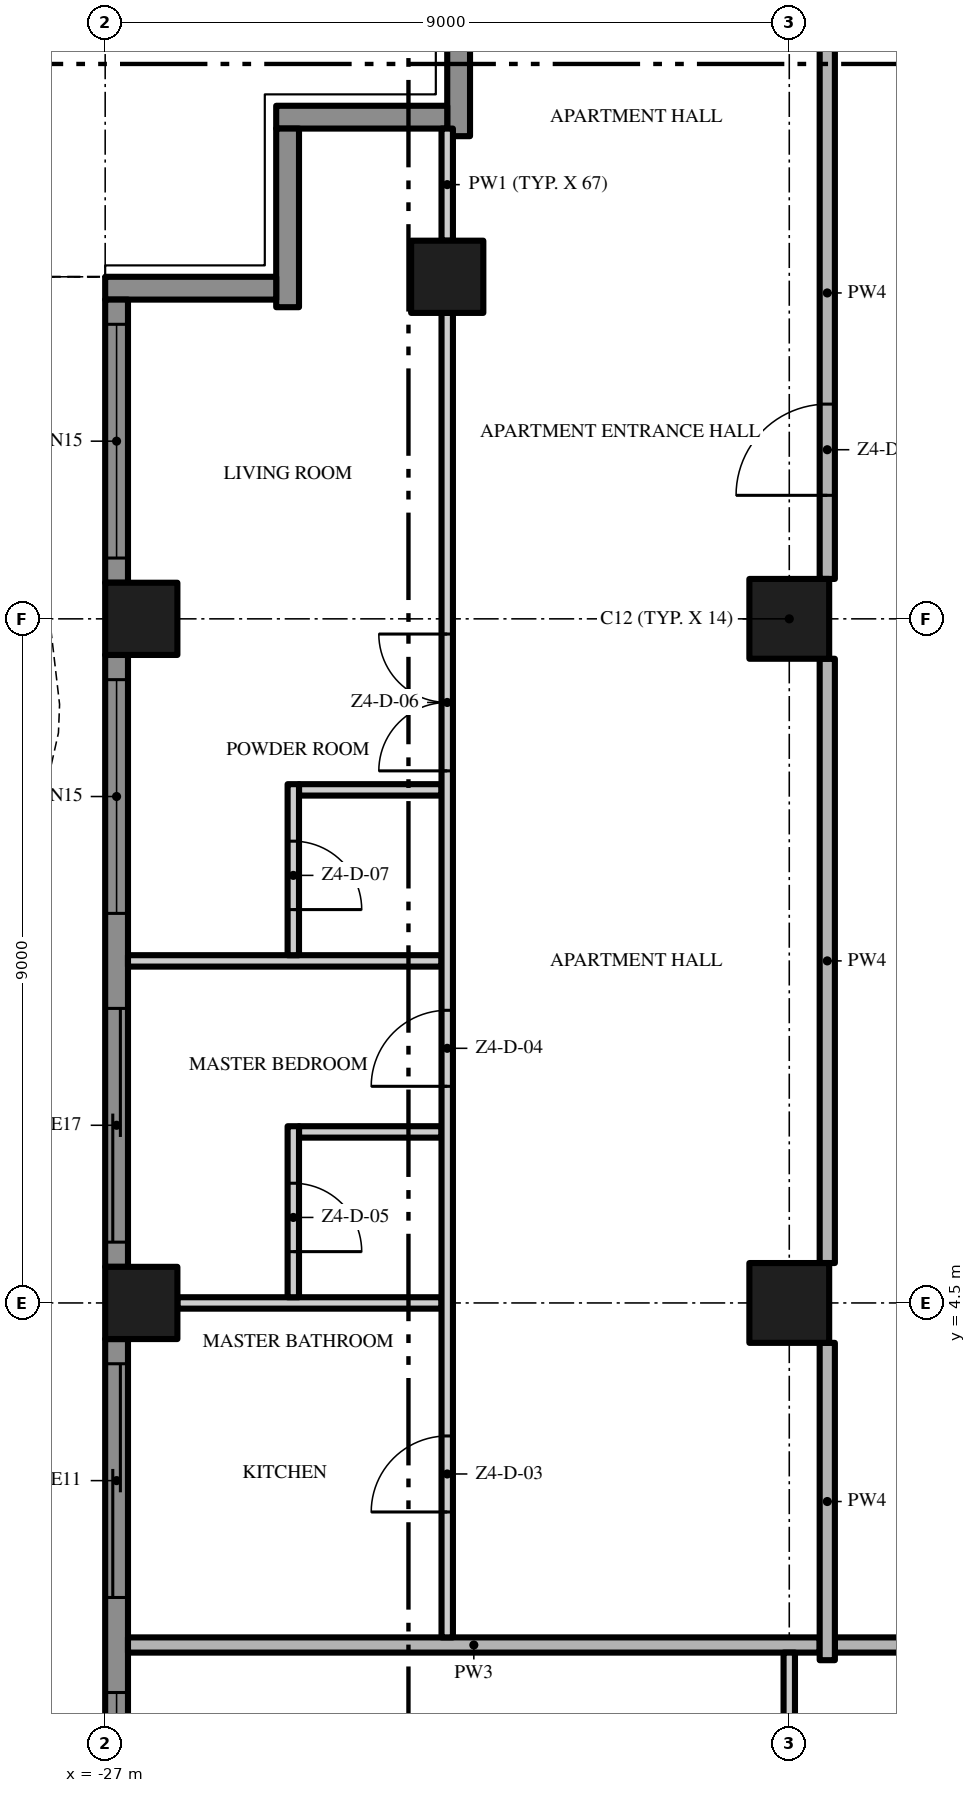
"""IFC4 building model, lengths in metres.
Left out: names, types, materials, properties, quantities, classifications, styles, units other than length and angle.
Written with IfcOpenShell. Run it as: python <this file> out.ifc"""

import sys

from ifc_helpers import new_model, si_unit, direction, frame, frame_2d, origin, origin_2d, place, context, subcontext, project, spatial, polyline, rectangle, outline, extrude, element, fill, save


model = new_model("IFC4")
c1 = context("Model", 3, precision=1e-05, world=origin(), true_north=direction((0.0, 1.0)))
c2 = subcontext(c1, "Body", "Model", "MODEL_VIEW")
j1 = project(units=[si_unit("LENGTHUNIT", "METRE"), si_unit("PLANEANGLEUNIT", "RADIAN")], contexts=[c1])
p1 = place(None, origin())
s1 = spatial("IfcSite", under=j1, at=p1, CompositionType="ELEMENT")
p2 = place(p1, origin())
s2 = spatial("IfcBuilding", under=s1, at=p2, CompositionType="ELEMENT")
p3 = place(p2, frame((0.0, 0.0, 222.4)))
s3 = spatial("IfcBuildingStorey", under=s2, at=p3, CompositionType="ELEMENT", Elevation=222.4)
for number, where, z_axis, x_axis in (
    (1, (-18.0, 13.5, 0.0), (0.0, 0.0, 1.0), (1.0, 0.0, 0.0)),
    (2, (-18.0, 4.5, 0.0), (0.0, 0.0, 1.0), (1.0, 0.0, 0.0)),
):
    element("IfcColumn", number, at=place(p3, frame(where, z_axis=z_axis, x_axis=x_axis)), inside=s3, PredefinedType="COLUMN", context=c2, shape_type="SweptSolid", body=[
        extrude(rectangle(XDim=1.05, YDim=1.05, at=origin_2d()), origin(), (0.0, 0.0, 1.0), 3.5),
    ])
for number, where, z_axis, x_axis in (
    (3, (-26.525, 13.5, 0.0), (0.0, 0.0, 1.0), (1.0, 0.0, 0.0)),
    (4, (-22.5, 18.0, 0.0), (0.0, 0.0, 1.0), (1.0, 0.0, 0.0)),
    (5, (-26.525, 4.5, 0.0), (0.0, 0.0, 1.0), (1.0, 0.0, 0.0)),
):
    element("IfcColumn", number, at=place(p3, frame(where, z_axis=z_axis, x_axis=x_axis)), inside=s3, PredefinedType="COLUMN", context=c2, shape_type="SweptSolid", body=[
        extrude(rectangle(XDim=0.95, YDim=0.95, at=origin_2d()), origin(), (0.0, 0.0, 1.0), 3.5),
    ])
p4 = place(p3, frame((-22.35, 19.85, 0.0), z_axis=(0.0, 0.0, 1.0), x_axis=(0.0, 1.0, 0.0)))
e6 = element("IfcWall", 6, at=p4, inside=s3, PredefinedType="SOLIDWALL", context=c2, shape_type="SweptSolid", body=[
    extrude(rectangle(XDim=2.35, YDim=0.3, at=frame_2d((1.175, 0.0))), origin(), (0.0, 0.0, 1.0), 3.5),
])
p5 = place(p3, frame((-24.75, 20.1, 0.0), z_axis=(0.0, 0.0, 1.0), x_axis=(1.0, 0.0, 0.0)))
e7 = element("IfcWall", 7, at=p5, inside=s3, PredefinedType="SOLIDWALL", context=c2, shape_type="SweptSolid", body=[
    extrude(rectangle(XDim=2.25, YDim=0.3, at=frame_2d((1.125, 0.0))), origin(), (0.0, 0.0, 1.0), 3.5),
])
p6 = place(p3, frame((-24.6, 17.6, 0.0), z_axis=(0.0, 0.0, 1.0), x_axis=(0.0, 1.0, 0.0)))
e8 = element("IfcWall", 8, at=p6, inside=s3, PredefinedType="SOLIDWALL", context=c2, shape_type="SweptSolid", body=[
    extrude(rectangle(XDim=2.35, YDim=0.3, at=frame_2d((1.175, 0.0))), origin(), (0.0, 0.0, 1.0), 3.5),
])
p7 = place(p3, frame((-27.0, 17.85, 0.0), z_axis=(0.0, 0.0, 1.0), x_axis=(1.0, 0.0, 0.0)))
e9 = element("IfcWall", 9, at=p7, inside=s3, PredefinedType="SOLIDWALL", context=c2, shape_type="SweptSolid", body=[
    extrude(rectangle(XDim=2.25, YDim=0.3, at=frame_2d((1.125, 0.0))), origin(), (0.0, 0.0, 1.0), 3.5),
])
p8 = place(p3, frame((-26.85, 13.975, 0.0), z_axis=(0.0, 0.0, 1.0), x_axis=(0.0, 1.0, 0.0)))
e10 = element("IfcWall", 10, at=p8, inside=s3, PredefinedType="SOLIDWALL", context=c2, shape_type="SweptSolid", body=[
    extrude(rectangle(XDim=3.725, YDim=0.3, at=frame_2d((1.863, 0.0))), origin(), (0.0, 0.0, 1.0), 3.5),
])
p9 = place(p8, frame((0.325, 0.0, 0.45)))
e11 = element("IfcOpeningElement", 11, at=p9, cuts=e10, PredefinedType="OPENING", context=c2, shape_type="SweptSolid", body=[
    extrude(rectangle(XDim=3.075, YDim=2.65, at=frame_2d((1.538, 1.325))), frame((0.0, 0.16, 0.0), z_axis=(0.0, -1.0, 0.0), x_axis=(1.0, 0.0, 0.0)), (0.0, 0.0, 1.0), 0.32),
])
p10 = place(p3, frame((-26.85, 4.975, 0.0), z_axis=(0.0, 0.0, 1.0), x_axis=(0.0, 1.0, 0.0)))
e12 = element("IfcWall", 12, at=p10, inside=s3, PredefinedType="SOLIDWALL", context=c2, shape_type="SweptSolid", body=[
    extrude(rectangle(XDim=8.05, YDim=0.3, at=frame_2d((4.025, 0.0))), origin(), (0.0, 0.0, 1.0), 3.5),
])
p11 = place(p10, frame((4.65, 0.0, 0.45)))
e13 = element("IfcOpeningElement", 13, at=p11, cuts=e12, PredefinedType="OPENING", context=c2, shape_type="SweptSolid", body=[
    extrude(rectangle(XDim=3.075, YDim=2.65, at=frame_2d((1.538, 1.325))), frame((0.0, 0.16, 0.0), z_axis=(0.0, -1.0, 0.0), x_axis=(1.0, 0.0, 0.0)), (0.0, 0.0, 1.0), 0.32),
])
p12 = place(p10, frame((0.325, 0.0, 0.0)))
e14 = element("IfcOpeningElement", 14, at=p12, cuts=e12, PredefinedType="OPENING", context=c2, shape_type="SweptSolid", body=[
    extrude(rectangle(XDim=3.075, YDim=2.4, at=frame_2d((1.538, 1.2))), frame((0.0, 0.16, 0.0), z_axis=(0.0, -1.0, 0.0), x_axis=(1.0, 0.0, 0.0)), (0.0, 0.0, 1.0), 0.32),
])
p13 = place(p3, frame((-26.85, -4.025, 0.0), z_axis=(0.0, 0.0, 1.0), x_axis=(0.0, 1.0, 0.0)))
e15 = element("IfcWall", 15, at=p13, inside=s3, PredefinedType="SOLIDWALL", context=c2, shape_type="SweptSolid", body=[
    extrude(rectangle(XDim=8.05, YDim=0.3, at=frame_2d((4.025, 0.0))), origin(), (0.0, 0.0, 1.0), 3.5),
])
p14 = place(p13, frame((4.65, 0.0, 0.0)))
e16 = element("IfcOpeningElement", 16, at=p14, cuts=e15, PredefinedType="OPENING", context=c2, shape_type="SweptSolid", body=[
    extrude(rectangle(XDim=3.075, YDim=2.4, at=frame_2d((1.538, 1.2))), frame((0.0, 0.16, 0.0), z_axis=(0.0, -1.0, 0.0), x_axis=(1.0, 0.0, 0.0)), (0.0, 0.0, 1.0), 0.32),
])
p15 = place(p13, frame((0.325, 0.0, 0.45)))
e17 = element("IfcOpeningElement", 17, at=p15, cuts=e15, PredefinedType="OPENING", context=c2, shape_type="SweptSolid", body=[
    extrude(rectangle(XDim=3.075, YDim=2.65, at=frame_2d((1.538, 1.325))), frame((0.0, 0.16, 0.0), z_axis=(0.0, -1.0, 0.0), x_axis=(1.0, 0.0, 0.0)), (0.0, 0.0, 1.0), 0.32),
])
p16 = place(p3, origin())
e18 = element("IfcWall", 18, at=p16, inside=s3, PredefinedType="USERDEFINED", context=c2, shape_type="SweptSolid", body=[
    extrude(outline(polyline([(-29.649, 18.0), (-28.988, 16.5), (-28.255, 15.0), (-27.731, 13.5), (-27.6, 12.375), (-27.615, 12.0), (-27.951, 10.5), (-28.612, 9.0), (-29.345, 7.5), (-29.869, 6.0), (-30.0, 4.875), (-29.985, 4.5), (-29.649, 3.0), (-28.988, 1.5), (-28.255, 0.0), (-27.731, -1.5), (-27.6, -2.625), (-27.615, -3.0), (-27.951, -4.5), (-28.612, -6.0), (-29.345, -7.5), (-29.869, -9.0), (-30.0, -10.125), (-29.985, -10.5), (-29.649, -12.0), (-28.988, -13.5), (-28.255, -15.0), (-27.731, -16.5), (-27.6, -17.625), (-27.615, -18.0), (-27.365, -18.01), (-27.349, -17.615), (-27.486, -16.444), (-28.024, -14.904), (-28.761, -13.395), (-29.41, -11.921), (-29.736, -10.467), (-29.749, -10.135), (-29.624, -9.056), (-29.114, -7.596), (-28.385, -6.105), (-27.713, -4.579), (-27.366, -3.033), (-27.349, -2.615), (-27.486, -1.444), (-28.024, 0.096), (-28.761, 1.605), (-29.41, 3.079), (-29.736, 4.533), (-29.749, 4.865), (-29.624, 5.944), (-29.114, 7.404), (-28.385, 8.895), (-27.713, 10.421), (-27.366, 11.967), (-27.349, 12.385), (-27.486, 13.556), (-28.024, 15.096), (-28.761, 16.605), (-29.42, 18.101), (-29.649, 18.0)])), origin(), (0.0, 0.0, 1.0), 0.9),
])
p17 = place(p3, frame((-17.4, 0.0, 0.0), z_axis=(0.0, 0.0, 1.0), x_axis=(1.0, 0.0, 0.0)))
e19 = element("IfcWall", 19, at=p17, inside=s3, PredefinedType="PARTITIONING", context=c2, shape_type="SweptSolid", body=[
    extrude(rectangle(XDim=12.8, YDim=0.2, at=frame_2d((6.4, 0.0))), origin(), (0.0, 0.0, 1.0), 3.5),
])
p18 = place(p3, frame((-26.7, 0.0, 0.0), z_axis=(0.0, 0.0, 1.0), x_axis=(1.0, 0.0, 0.0)))
e20 = element("IfcWall", 20, at=p18, inside=s3, PredefinedType="PARTITIONING", context=c2, shape_type="SweptSolid", body=[
    extrude(rectangle(XDim=9.1, YDim=0.2, at=frame_2d((4.55, 0.0))), origin(), (0.0, 0.0, 1.0), 3.5),
])
p19 = place(p3, frame((-26.05, 4.5, 0.0), z_axis=(0.0, 0.0, 1.0), x_axis=(1.0, 0.0, 0.0)))
e21 = element("IfcWall", 21, at=p19, inside=s3, PredefinedType="PARTITIONING", context=c2, shape_type="SweptSolid", body=[
    extrude(rectangle(XDim=3.475, YDim=0.15, at=frame_2d((1.738, 0.0))), origin(), (0.0, 0.0, 1.0), 3.5),
])
p20 = place(p3, frame((-24.45, 6.75, 0.0), z_axis=(0.0, 0.0, 1.0), x_axis=(1.0, 0.0, 0.0)))
e22 = element("IfcWall", 22, at=p20, inside=s3, PredefinedType="PARTITIONING", context=c2, shape_type="SweptSolid", body=[
    extrude(rectangle(XDim=1.875, YDim=0.15, at=frame_2d((0.938, 0.0))), origin(), (0.0, 0.0, 1.0), 3.5),
])
p21 = place(p3, frame((-26.7, 9.0, 0.0), z_axis=(0.0, 0.0, 1.0), x_axis=(1.0, 0.0, 0.0)))
e23 = element("IfcWall", 23, at=p21, inside=s3, PredefinedType="PARTITIONING", context=c2, shape_type="SweptSolid", body=[
    extrude(rectangle(XDim=4.125, YDim=0.15, at=frame_2d((2.062, 0.0))), origin(), (0.0, 0.0, 1.0), 3.5),
])
p22 = place(p3, frame((-24.45, 11.25, 0.0), z_axis=(0.0, 0.0, 1.0), x_axis=(1.0, 0.0, 0.0)))
e24 = element("IfcWall", 24, at=p22, inside=s3, PredefinedType="PARTITIONING", context=c2, shape_type="SweptSolid", body=[
    extrude(rectangle(XDim=1.875, YDim=0.15, at=frame_2d((0.938, 0.0))), origin(), (0.0, 0.0, 1.0), 3.5),
])
p23 = place(p3, frame((-24.525, 6.825, 0.0), z_axis=(0.0, 0.0, 1.0), x_axis=(0.0, -1.0, 0.0)))
e25 = element("IfcWall", 25, at=p23, inside=s3, PredefinedType="PARTITIONING", context=c2, shape_type="SweptSolid", body=[
    extrude(rectangle(XDim=2.25, YDim=0.15, at=frame_2d((1.125, 0.0))), origin(), (0.0, 0.0, 1.0), 3.5),
])
p24 = place(p23, frame((0.75, 0.0, 0.0)))
e26 = element("IfcOpeningElement", 26, at=p24, cuts=e25, PredefinedType="OPENING", context=c2, shape_type="SweptSolid", body=[
    extrude(rectangle(XDim=0.9, YDim=2.1, at=frame_2d((0.45, 1.05))), frame((0.0, 0.085, 0.0), z_axis=(0.0, -1.0, 0.0), x_axis=(1.0, 0.0, 0.0)), (0.0, 0.0, 1.0), 0.17),
])
p25 = place(p3, frame((-24.525, 11.325, 0.0), z_axis=(0.0, 0.0, 1.0), x_axis=(0.0, -1.0, 0.0)))
e27 = element("IfcWall", 27, at=p25, inside=s3, PredefinedType="PARTITIONING", context=c2, shape_type="SweptSolid", body=[
    extrude(rectangle(XDim=2.25, YDim=0.15, at=frame_2d((1.125, 0.0))), origin(), (0.0, 0.0, 1.0), 3.5),
])
p26 = place(p25, frame((0.75, 0.0, 0.0)))
e28 = element("IfcOpeningElement", 28, at=p26, cuts=e27, PredefinedType="OPENING", context=c2, shape_type="SweptSolid", body=[
    extrude(rectangle(XDim=0.9, YDim=2.1, at=frame_2d((0.45, 1.05))), frame((0.0, 0.085, 0.0), z_axis=(0.0, -1.0, 0.0), x_axis=(1.0, 0.0, 0.0)), (0.0, 0.0, 1.0), 0.17),
])
p27 = place(p3, frame((-22.5, 0.1, 0.0), z_axis=(0.0, 0.0, 1.0), x_axis=(0.0, 1.0, 0.0)))
e29 = element("IfcWall", 29, at=p27, inside=s3, PredefinedType="PARTITIONING", context=c2, shape_type="SweptSolid", body=[
    extrude(rectangle(XDim=17.425, YDim=0.15, at=frame_2d((8.713, 0.0))), origin(), (0.0, 0.0, 1.0), 3.5),
])
p28 = place(p27, frame((1.65, 0.0, 0.0)))
e30 = element("IfcOpeningElement", 30, at=p28, cuts=e29, PredefinedType="OPENING", context=c2, shape_type="SweptSolid", body=[
    extrude(rectangle(XDim=1.0, YDim=2.4, at=frame_2d((0.5, 1.2))), frame((0.0, 0.085, 0.0), z_axis=(0.0, -1.0, 0.0), x_axis=(1.0, 0.0, 0.0)), (0.0, 0.0, 1.0), 0.17),
])
p29 = place(p27, frame((7.25, 0.0, 0.0)))
e31 = element("IfcOpeningElement", 31, at=p29, cuts=e29, PredefinedType="OPENING", context=c2, shape_type="SweptSolid", body=[
    extrude(rectangle(XDim=1.0, YDim=2.4, at=frame_2d((0.5, 1.2))), frame((0.0, 0.085, 0.0), z_axis=(0.0, -1.0, 0.0), x_axis=(1.0, 0.0, 0.0)), (0.0, 0.0, 1.0), 0.17),
])
p30 = place(p27, frame((11.4, 0.0, 0.0)))
e32 = element("IfcOpeningElement", 32, at=p30, cuts=e29, PredefinedType="OPENING", context=c2, shape_type="SweptSolid", body=[
    extrude(rectangle(XDim=1.8, YDim=2.4, at=frame_2d((0.9, 1.2))), frame((0.0, 0.085, 0.0), z_axis=(0.0, -1.0, 0.0), x_axis=(1.0, 0.0, 0.0)), (0.0, 0.0, 1.0), 0.17),
])
p31 = place(p3, frame((-22.5, 18.475, 0.0), z_axis=(0.0, 0.0, 1.0), x_axis=(0.0, 1.0, 0.0)))
e33 = element("IfcWall", 33, at=p31, inside=s3, PredefinedType="PARTITIONING", context=c2, shape_type="SweptSolid", body=[
    extrude(rectangle(XDim=1.475, YDim=0.15, at=frame_2d((0.738, 0.0))), origin(), (0.0, 0.0, 1.0), 3.5),
])
p32 = place(p3, frame((-18.0, -3.975, 0.0), z_axis=(0.0, 0.0, 1.0), x_axis=(0.0, 1.0, 0.0)))
e34 = element("IfcWall", 34, at=p32, inside=s3, PredefinedType="PARTITIONING", context=c2, shape_type="SweptSolid", body=[
    extrude(rectangle(XDim=3.875, YDim=0.15, at=frame_2d((1.938, 0.0))), origin(), (0.0, 0.0, 1.0), 3.5),
])
p33 = place(p32, frame((1.0, 0.0, 0.0)))
e35 = element("IfcOpeningElement", 35, at=p33, cuts=e34, PredefinedType="OPENING", context=c2, shape_type="SweptSolid", body=[
    extrude(rectangle(XDim=1.5, YDim=2.4, at=frame_2d((0.75, 1.2))), frame((0.0, 0.085, 0.0), z_axis=(0.0, -1.0, 0.0), x_axis=(1.0, 0.0, 0.0)), (0.0, 0.0, 1.0), 0.17),
])
p34 = place(p3, frame((-17.5, -0.2, 0.0), z_axis=(0.0, 0.0, 1.0), x_axis=(0.0, 1.0, 0.0)))
e36 = element("IfcWall", 36, at=p34, inside=s3, PredefinedType="PARTITIONING", context=c2, shape_type="SweptSolid", body=[
    extrude(rectangle(XDim=4.175, YDim=0.2, at=frame_2d((2.087, 0.0))), origin(), (0.0, 0.0, 1.0), 3.5),
])
p35 = place(p3, frame((-17.5, 5.025, 0.0), z_axis=(0.0, 0.0, 1.0), x_axis=(0.0, 1.0, 0.0)))
e37 = element("IfcWall", 37, at=p35, inside=s3, PredefinedType="PARTITIONING", context=c2, shape_type="SweptSolid", body=[
    extrude(rectangle(XDim=7.95, YDim=0.2, at=frame_2d((3.975, 0.0))), origin(), (0.0, 0.0, 1.0), 3.5),
])
p36 = place(p3, frame((-17.5, 14.025, 0.0), z_axis=(0.0, 0.0, 1.0), x_axis=(0.0, 1.0, 0.0)))
e38 = element("IfcWall", 38, at=p36, inside=s3, PredefinedType="PARTITIONING", context=c2, shape_type="SweptSolid", body=[
    extrude(rectangle(XDim=7.525, YDim=0.2, at=frame_2d((3.763, 0.0))), origin(), (0.0, 0.0, 1.0), 3.5),
])
p37 = place(p36, frame((1.1, 0.0, 0.0)))
e39 = element("IfcOpeningElement", 39, at=p37, cuts=e38, PredefinedType="OPENING", context=c2, shape_type="SweptSolid", body=[
    extrude(rectangle(XDim=1.2, YDim=2.4, at=frame_2d((0.6, 1.2))), frame((0.0, 0.11, 0.0), z_axis=(0.0, -1.0, 0.0), x_axis=(1.0, 0.0, 0.0)), (0.0, 0.0, 1.0), 0.22),
])
p38 = place(p9, origin())
e40 = element("IfcWindow", 40, at=p38, inside=s3, PartitioningType="SINGLE_PANEL", PredefinedType="WINDOW", context=c2, shape_type="SweptSolid", body=[
    extrude(rectangle(XDim=3.075, YDim=2.65, at=frame_2d((1.538, 1.325))), frame((0.0, 0.03, 0.0), z_axis=(0.0, -1.0, 0.0), x_axis=(1.0, 0.0, 0.0)), (0.0, 0.0, 1.0), 0.06),
])
fill(e11, e40)
p39 = place(p11, origin())
e41 = element("IfcWindow", 41, at=p39, inside=s3, PartitioningType="SINGLE_PANEL", PredefinedType="WINDOW", context=c2, shape_type="SweptSolid", body=[
    extrude(rectangle(XDim=3.075, YDim=2.65, at=frame_2d((1.538, 1.325))), frame((0.0, 0.03, 0.0), z_axis=(0.0, -1.0, 0.0), x_axis=(1.0, 0.0, 0.0)), (0.0, 0.0, 1.0), 0.06),
])
fill(e13, e41)
p40 = place(p12, origin())
e42 = element("IfcDoor", 42, at=p40, inside=s3, OperationType="SINGLE_SWING_LEFT", PredefinedType="DOOR", context=c2, shape_type="SweptSolid", body=[
    extrude(rectangle(XDim=3.075, YDim=2.4, at=frame_2d((1.538, 1.2))), frame((0.0, 0.025, 0.0), z_axis=(0.0, -1.0, 0.0), x_axis=(1.0, 0.0, 0.0)), (0.0, 0.0, 1.0), 0.05),
])
fill(e14, e42)
p41 = place(p14, origin())
e43 = element("IfcDoor", 43, at=p41, inside=s3, OperationType="SINGLE_SWING_LEFT", PredefinedType="DOOR", context=c2, shape_type="SweptSolid", body=[
    extrude(rectangle(XDim=3.075, YDim=2.4, at=frame_2d((1.538, 1.2))), frame((0.0, 0.025, 0.0), z_axis=(0.0, -1.0, 0.0), x_axis=(1.0, 0.0, 0.0)), (0.0, 0.0, 1.0), 0.05),
])
fill(e16, e43)
p42 = place(p15, origin())
e44 = element("IfcWindow", 44, at=p42, inside=s3, PartitioningType="SINGLE_PANEL", PredefinedType="WINDOW", context=c2, shape_type="SweptSolid", body=[
    extrude(rectangle(XDim=3.075, YDim=2.65, at=frame_2d((1.538, 1.325))), frame((0.0, 0.03, 0.0), z_axis=(0.0, -1.0, 0.0), x_axis=(1.0, 0.0, 0.0)), (0.0, 0.0, 1.0), 0.06),
])
fill(e17, e44)
p43 = place(p37, origin())
e45 = element("IfcDoor", 45, at=p43, inside=s3, OperationType="SINGLE_SWING_LEFT", PredefinedType="DOOR", context=c2, shape_type="SweptSolid", body=[
    extrude(rectangle(XDim=1.2, YDim=2.4, at=frame_2d((0.6, 1.2))), frame((0.0, 0.025, 0.0), z_axis=(0.0, -1.0, 0.0), x_axis=(1.0, 0.0, 0.0)), (0.0, 0.0, 1.0), 0.05),
])
fill(e39, e45)
p44 = place(p28, origin())
e46 = element("IfcDoor", 46, at=p44, inside=s3, OperationType="SINGLE_SWING_LEFT", PredefinedType="DOOR", context=c2, shape_type="SweptSolid", body=[
    extrude(rectangle(XDim=1.0, YDim=2.4, at=frame_2d((0.5, 1.2))), frame((0.0, 0.025, 0.0), z_axis=(0.0, -1.0, 0.0), x_axis=(1.0, 0.0, 0.0)), (0.0, 0.0, 1.0), 0.05),
])
fill(e30, e46)
p45 = place(p29, origin())
e47 = element("IfcDoor", 47, at=p45, inside=s3, OperationType="SINGLE_SWING_LEFT", PredefinedType="DOOR", context=c2, shape_type="SweptSolid", body=[
    extrude(rectangle(XDim=1.0, YDim=2.4, at=frame_2d((0.5, 1.2))), frame((0.0, 0.025, 0.0), z_axis=(0.0, -1.0, 0.0), x_axis=(1.0, 0.0, 0.0)), (0.0, 0.0, 1.0), 0.05),
])
fill(e31, e47)
p46 = place(p24, origin())
e48 = element("IfcDoor", 48, at=p46, inside=s3, OperationType="SINGLE_SWING_RIGHT", PredefinedType="DOOR", context=c2, shape_type="SweptSolid", body=[
    extrude(rectangle(XDim=0.9, YDim=2.1, at=frame_2d((0.45, 1.05))), frame((0.0, 0.025, 0.0), z_axis=(0.0, -1.0, 0.0), x_axis=(1.0, 0.0, 0.0)), (0.0, 0.0, 1.0), 0.05),
])
fill(e26, e48)
p47 = place(p30, origin())
e49 = element("IfcDoor", 49, at=p47, inside=s3, OperationType="DOUBLE_DOOR_SINGLE_SWING", PredefinedType="DOOR", context=c2, shape_type="SweptSolid", body=[
    extrude(rectangle(XDim=1.8, YDim=2.4, at=frame_2d((0.9, 1.2))), frame((0.0, 0.025, 0.0), z_axis=(0.0, -1.0, 0.0), x_axis=(1.0, 0.0, 0.0)), (0.0, 0.0, 1.0), 0.05),
])
fill(e32, e49)
p48 = place(p26, origin())
e50 = element("IfcDoor", 50, at=p48, inside=s3, OperationType="SINGLE_SWING_RIGHT", PredefinedType="DOOR", context=c2, shape_type="SweptSolid", body=[
    extrude(rectangle(XDim=0.9, YDim=2.1, at=frame_2d((0.45, 1.05))), frame((0.0, 0.025, 0.0), z_axis=(0.0, -1.0, 0.0), x_axis=(1.0, 0.0, 0.0)), (0.0, 0.0, 1.0), 0.05),
])
fill(e28, e50)
save(model, sys.argv[1])
